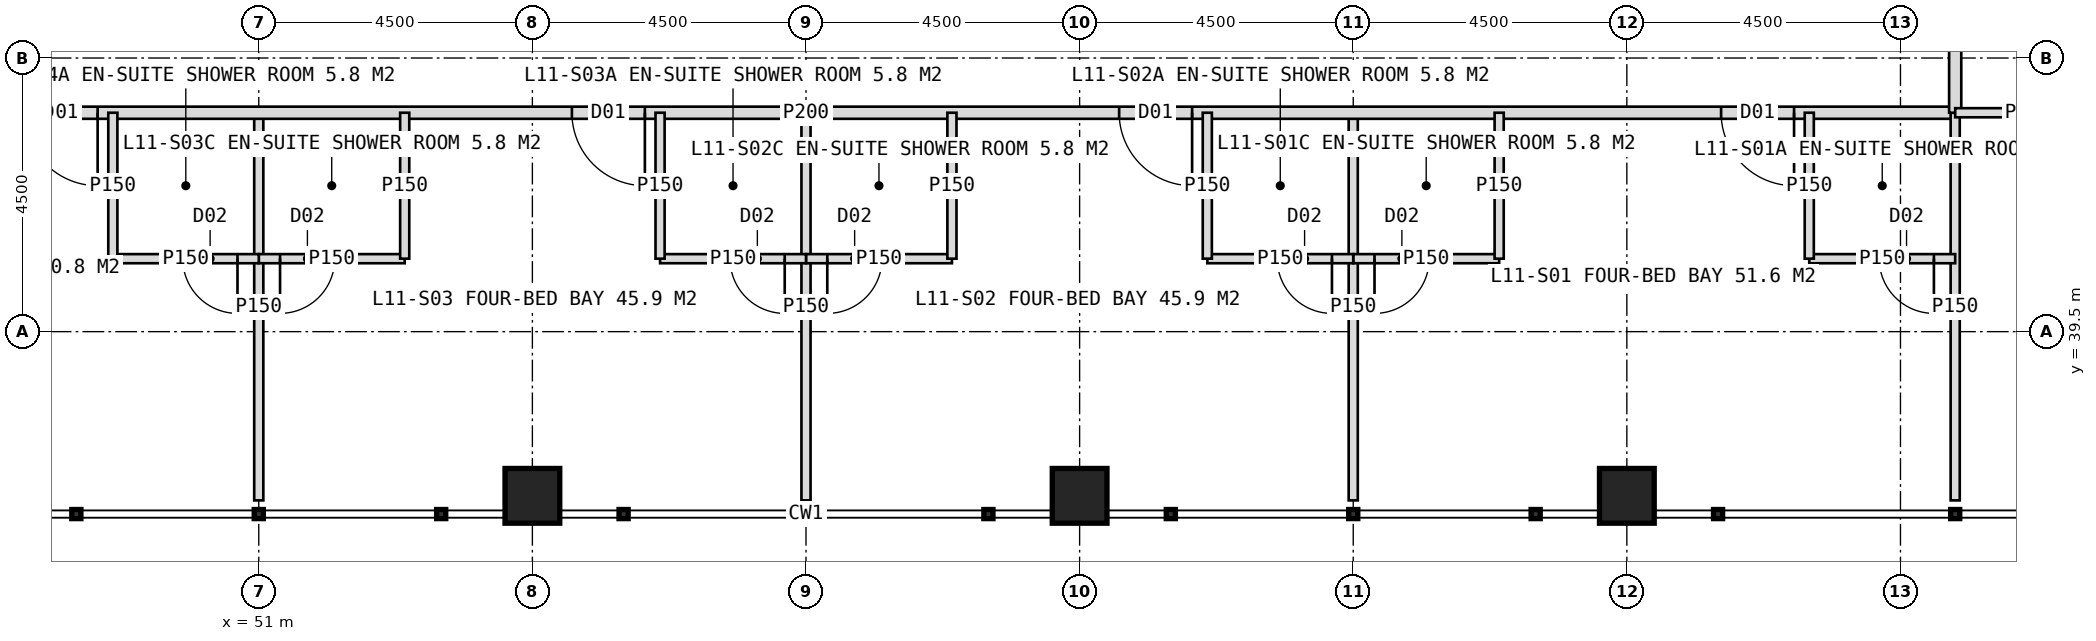
"""IFC4 building model, lengths in metres.
Left out: names, types, materials, properties, quantities, classifications, styles, units other than length and angle.
Written with IfcOpenShell. Run it as: python <this file> out.ifc"""

import sys

from ifc_helpers import new_model, si_unit, direction, frame, frame_2d, origin, origin_2d, place, context, subcontext, project, spatial, rectangle, hollow_rectangle, extrude, element, fill, save


model = new_model("IFC4")
c1 = context("Model", 3, precision=1e-05, world=origin(), true_north=direction((0.0, 1.0)))
c2 = subcontext(c1, "Body", "Model", "MODEL_VIEW")
j1 = project(units=[si_unit("LENGTHUNIT", "METRE"), si_unit("PLANEANGLEUNIT", "RADIAN")], contexts=[c1])
p1 = place(None, origin())
s1 = spatial("IfcSite", under=j1, at=p1, CompositionType="ELEMENT")
p2 = place(p1, origin())
s2 = spatial("IfcBuilding", under=s1, at=p2, CompositionType="ELEMENT")
p3 = place(p2, frame((0.0, 0.0, 51.0)))
s3 = spatial("IfcBuildingStorey", under=s2, at=p3, CompositionType="ELEMENT", Elevation=51.0)
for number, where, z_axis, x_axis in (
    (1, (55.5, 36.8, 0.0), (0.0, 0.0, 1.0), (1.0, 0.0, 0.0)),
    (2, (64.5, 36.8, 0.0), (0.0, 0.0, 1.0), (1.0, 0.0, 0.0)),
    (3, (73.5, 36.8, 0.0), (0.0, 0.0, 1.0), (1.0, 0.0, 0.0)),
):
    element("IfcColumn", number, at=place(p3, frame(where, z_axis=z_axis, x_axis=x_axis)), inside=s3, PredefinedType="COLUMN", context=c2, shape_type="SweptSolid", body=[
        extrude(hollow_rectangle(XDim=0.9, YDim=0.9, WallThickness=0.08, at=origin_2d()), origin(), (0.0, 0.0, 1.0), 4.0),
    ])
p4 = place(p3, frame((69.0, 43.1, 0.0), z_axis=(0.0, 0.0, 1.0), x_axis=(0.0, -1.0, 0.0)))
e4 = element("IfcWall", 4, at=p4, inside=s3, PredefinedType="PARTITIONING", context=c2, shape_type="SweptSolid", body=[
    extrude(rectangle(XDim=6.375, YDim=0.15, at=frame_2d((3.188, 0.0))), origin(), (0.0, 0.0, 1.0), 3.75),
])
p5 = place(p3, frame((60.0, 43.1, 0.0), z_axis=(0.0, 0.0, 1.0), x_axis=(0.0, -1.0, 0.0)))
e5 = element("IfcWall", 5, at=p5, inside=s3, PredefinedType="PARTITIONING", context=c2, shape_type="SweptSolid", body=[
    extrude(rectangle(XDim=6.375, YDim=0.15, at=frame_2d((3.188, 0.0))), origin(), (0.0, 0.0, 1.0), 2.75),
])
p6 = place(p3, frame((51.0, 43.1, 0.0), z_axis=(0.0, 0.0, 1.0), x_axis=(0.0, -1.0, 0.0)))
e6 = element("IfcWall", 6, at=p6, inside=s3, PredefinedType="PARTITIONING", context=c2, shape_type="SweptSolid", body=[
    extrude(rectangle(XDim=6.375, YDim=0.15, at=frame_2d((3.188, 0.0))), origin(), (0.0, 0.0, 1.0), 3.75),
])
p7 = place(p3, frame((78.9, 43.1, 0.0), z_axis=(0.0, 0.0, 1.0), x_axis=(-1.0, 0.0, 0.0)))
e7 = element("IfcWall", 7, at=p7, inside=s3, PredefinedType="PARTITIONING", context=c2, shape_type="SweptSolid", body=[
    extrude(rectangle(XDim=37.8, YDim=0.2, at=frame_2d((18.9, 0.0))), origin(), (0.0, 0.0, 1.0), 3.75),
])
p8 = place(p7, frame((2.65, 0.0, 0.0)))
e8 = element("IfcOpeningElement", 8, at=p8, cuts=e7, PredefinedType="OPENING", context=c2, shape_type="SweptSolid", body=[
    extrude(rectangle(XDim=1.2, YDim=2.2, at=frame_2d((0.6, 1.1))), frame((0.0, 0.11, 0.0), z_axis=(0.0, -1.0, 0.0), x_axis=(1.0, 0.0, 0.0)), (0.0, 0.0, 1.0), 0.22),
])
p9 = place(p7, frame((12.55, 0.0, 0.0)))
e9 = element("IfcOpeningElement", 9, at=p9, cuts=e7, PredefinedType="OPENING", context=c2, shape_type="SweptSolid", body=[
    extrude(rectangle(XDim=1.2, YDim=2.2, at=frame_2d((0.6, 1.1))), frame((0.0, 0.11, 0.0), z_axis=(0.0, -1.0, 0.0), x_axis=(1.0, 0.0, 0.0)), (0.0, 0.0, 1.0), 0.22),
])
p10 = place(p7, frame((21.55, 0.0, 0.0)))
e10 = element("IfcOpeningElement", 10, at=p10, cuts=e7, PredefinedType="OPENING", context=c2, shape_type="SweptSolid", body=[
    extrude(rectangle(XDim=1.2, YDim=2.2, at=frame_2d((0.6, 1.1))), frame((0.0, 0.11, 0.0), z_axis=(0.0, -1.0, 0.0), x_axis=(1.0, 0.0, 0.0)), (0.0, 0.0, 1.0), 0.22),
])
p11 = place(p7, frame((30.55, 0.0, 0.0)))
e11 = element("IfcOpeningElement", 11, at=p11, cuts=e7, PredefinedType="OPENING", context=c2, shape_type="SweptSolid", body=[
    extrude(rectangle(XDim=1.2, YDim=2.2, at=frame_2d((0.6, 1.1))), frame((0.0, 0.11, 0.0), z_axis=(0.0, -1.0, 0.0), x_axis=(1.0, 0.0, 0.0)), (0.0, 0.0, 1.0), 0.22),
])
p12 = place(p3, frame((78.9, 43.1, 0.0), z_axis=(0.0, 0.0, 1.0), x_axis=(0.0, -1.0, 0.0)))
e12 = element("IfcWall", 12, at=p12, inside=s3, PredefinedType="PARTITIONING", context=c2, shape_type="SweptSolid", body=[
    extrude(rectangle(XDim=6.375, YDim=0.15, at=frame_2d((3.188, 0.0))), origin(), (0.0, 0.0, 1.0), 3.75),
])
p13 = place(p3, frame((78.9, 40.7, 0.0), z_axis=(0.0, 0.0, 1.0), x_axis=(-1.0, 0.0, 0.0)))
e13 = element("IfcWall", 13, at=p13, inside=s3, PredefinedType="PARTITIONING", context=c2, shape_type="SweptSolid", body=[
    extrude(rectangle(XDim=2.4, YDim=0.15, at=frame_2d((1.2, 0.0))), origin(), (0.0, 0.0, 1.0), 3.75),
])
p14 = place(p13, frame((0.35, 0.0, 0.0)))
e14 = element("IfcOpeningElement", 14, at=p14, cuts=e13, PredefinedType="OPENING", context=c2, shape_type="SweptSolid", body=[
    extrude(rectangle(XDim=0.9, YDim=2.1, at=frame_2d((0.45, 1.05))), frame((0.0, 0.085, 0.0), z_axis=(0.0, -1.0, 0.0), x_axis=(1.0, 0.0, 0.0)), (0.0, 0.0, 1.0), 0.17),
])
p15 = place(p3, frame((76.5, 43.1, 0.0), z_axis=(0.0, 0.0, 1.0), x_axis=(0.0, -1.0, 0.0)))
e15 = element("IfcWall", 15, at=p15, inside=s3, PredefinedType="PARTITIONING", context=c2, shape_type="SweptSolid", body=[
    extrude(rectangle(XDim=2.4, YDim=0.15, at=frame_2d((1.2, 0.0))), origin(), (0.0, 0.0, 1.0), 3.75),
])
p16 = place(p3, frame((71.4, 40.7, 0.0), z_axis=(0.0, 0.0, 1.0), x_axis=(-1.0, 0.0, 0.0)))
e16 = element("IfcWall", 16, at=p16, inside=s3, PredefinedType="PARTITIONING", context=c2, shape_type="SweptSolid", body=[
    extrude(rectangle(XDim=2.4, YDim=0.15, at=frame_2d((1.2, 0.0))), origin(), (0.0, 0.0, 1.0), 3.75),
])
p17 = place(p16, frame((1.15, 0.0, 0.0)))
e17 = element("IfcOpeningElement", 17, at=p17, cuts=e16, PredefinedType="OPENING", context=c2, shape_type="SweptSolid", body=[
    extrude(rectangle(XDim=0.9, YDim=2.1, at=frame_2d((0.45, 1.05))), frame((0.0, 0.085, 0.0), z_axis=(0.0, -1.0, 0.0), x_axis=(1.0, 0.0, 0.0)), (0.0, 0.0, 1.0), 0.17),
])
p18 = place(p3, frame((71.4, 43.1, 0.0), z_axis=(0.0, 0.0, 1.0), x_axis=(0.0, -1.0, 0.0)))
e18 = element("IfcWall", 18, at=p18, inside=s3, PredefinedType="PARTITIONING", context=c2, shape_type="SweptSolid", body=[
    extrude(rectangle(XDim=2.4, YDim=0.15, at=frame_2d((1.2, 0.0))), origin(), (0.0, 0.0, 1.0), 3.75),
])
p19 = place(p3, frame((69.0, 40.7, 0.0), z_axis=(0.0, 0.0, 1.0), x_axis=(-1.0, 0.0, 0.0)))
e19 = element("IfcWall", 19, at=p19, inside=s3, PredefinedType="PARTITIONING", context=c2, shape_type="SweptSolid", body=[
    extrude(rectangle(XDim=2.4, YDim=0.15, at=frame_2d((1.2, 0.0))), origin(), (0.0, 0.0, 1.0), 3.75),
])
p20 = place(p19, frame((0.35, 0.0, 0.0)))
e20 = element("IfcOpeningElement", 20, at=p20, cuts=e19, PredefinedType="OPENING", context=c2, shape_type="SweptSolid", body=[
    extrude(rectangle(XDim=0.9, YDim=2.1, at=frame_2d((0.45, 1.05))), frame((0.0, 0.085, 0.0), z_axis=(0.0, -1.0, 0.0), x_axis=(1.0, 0.0, 0.0)), (0.0, 0.0, 1.0), 0.17),
])
p21 = place(p3, frame((66.6, 43.1, 0.0), z_axis=(0.0, 0.0, 1.0), x_axis=(0.0, -1.0, 0.0)))
e21 = element("IfcWall", 21, at=p21, inside=s3, PredefinedType="PARTITIONING", context=c2, shape_type="SweptSolid", body=[
    extrude(rectangle(XDim=2.4, YDim=0.15, at=frame_2d((1.2, 0.0))), origin(), (0.0, 0.0, 1.0), 3.75),
])
p22 = place(p3, frame((62.4, 40.7, 0.0), z_axis=(0.0, 0.0, 1.0), x_axis=(-1.0, 0.0, 0.0)))
e22 = element("IfcWall", 22, at=p22, inside=s3, PredefinedType="PARTITIONING", context=c2, shape_type="SweptSolid", body=[
    extrude(rectangle(XDim=2.4, YDim=0.15, at=frame_2d((1.2, 0.0))), origin(), (0.0, 0.0, 1.0), 3.75),
])
p23 = place(p22, frame((1.15, 0.0, 0.0)))
e23 = element("IfcOpeningElement", 23, at=p23, cuts=e22, PredefinedType="OPENING", context=c2, shape_type="SweptSolid", body=[
    extrude(rectangle(XDim=0.9, YDim=2.1, at=frame_2d((0.45, 1.05))), frame((0.0, 0.085, 0.0), z_axis=(0.0, -1.0, 0.0), x_axis=(1.0, 0.0, 0.0)), (0.0, 0.0, 1.0), 0.17),
])
p24 = place(p3, frame((62.4, 43.1, 0.0), z_axis=(0.0, 0.0, 1.0), x_axis=(0.0, -1.0, 0.0)))
e24 = element("IfcWall", 24, at=p24, inside=s3, PredefinedType="PARTITIONING", context=c2, shape_type="SweptSolid", body=[
    extrude(rectangle(XDim=2.4, YDim=0.15, at=frame_2d((1.2, 0.0))), origin(), (0.0, 0.0, 1.0), 3.75),
])
p25 = place(p3, frame((60.0, 40.7, 0.0), z_axis=(0.0, 0.0, 1.0), x_axis=(-1.0, 0.0, 0.0)))
e25 = element("IfcWall", 25, at=p25, inside=s3, PredefinedType="PARTITIONING", context=c2, shape_type="SweptSolid", body=[
    extrude(rectangle(XDim=2.4, YDim=0.15, at=frame_2d((1.2, 0.0))), origin(), (0.0, 0.0, 1.0), 3.75),
])
p26 = place(p25, frame((0.35, 0.0, 0.0)))
e26 = element("IfcOpeningElement", 26, at=p26, cuts=e25, PredefinedType="OPENING", context=c2, shape_type="SweptSolid", body=[
    extrude(rectangle(XDim=0.9, YDim=2.1, at=frame_2d((0.45, 1.05))), frame((0.0, 0.085, 0.0), z_axis=(0.0, -1.0, 0.0), x_axis=(1.0, 0.0, 0.0)), (0.0, 0.0, 1.0), 0.17),
])
p27 = place(p3, frame((57.6, 43.1, 0.0), z_axis=(0.0, 0.0, 1.0), x_axis=(0.0, -1.0, 0.0)))
e27 = element("IfcWall", 27, at=p27, inside=s3, PredefinedType="PARTITIONING", context=c2, shape_type="SweptSolid", body=[
    extrude(rectangle(XDim=2.4, YDim=0.15, at=frame_2d((1.2, 0.0))), origin(), (0.0, 0.0, 1.0), 3.75),
])
p28 = place(p3, frame((53.4, 40.7, 0.0), z_axis=(0.0, 0.0, 1.0), x_axis=(-1.0, 0.0, 0.0)))
e28 = element("IfcWall", 28, at=p28, inside=s3, PredefinedType="PARTITIONING", context=c2, shape_type="SweptSolid", body=[
    extrude(rectangle(XDim=2.4, YDim=0.15, at=frame_2d((1.2, 0.0))), origin(), (0.0, 0.0, 1.0), 3.75),
])
p29 = place(p28, frame((1.15, 0.0, 0.0)))
e29 = element("IfcOpeningElement", 29, at=p29, cuts=e28, PredefinedType="OPENING", context=c2, shape_type="SweptSolid", body=[
    extrude(rectangle(XDim=0.9, YDim=2.1, at=frame_2d((0.45, 1.05))), frame((0.0, 0.085, 0.0), z_axis=(0.0, -1.0, 0.0), x_axis=(1.0, 0.0, 0.0)), (0.0, 0.0, 1.0), 0.17),
])
p30 = place(p3, frame((53.4, 43.1, 0.0), z_axis=(0.0, 0.0, 1.0), x_axis=(0.0, -1.0, 0.0)))
e30 = element("IfcWall", 30, at=p30, inside=s3, PredefinedType="PARTITIONING", context=c2, shape_type="SweptSolid", body=[
    extrude(rectangle(XDim=2.4, YDim=0.15, at=frame_2d((1.2, 0.0))), origin(), (0.0, 0.0, 1.0), 3.75),
])
p31 = place(p3, frame((51.0, 40.7, 0.0), z_axis=(0.0, 0.0, 1.0), x_axis=(-1.0, 0.0, 0.0)))
e31 = element("IfcWall", 31, at=p31, inside=s3, PredefinedType="PARTITIONING", context=c2, shape_type="SweptSolid", body=[
    extrude(rectangle(XDim=2.4, YDim=0.15, at=frame_2d((1.2, 0.0))), origin(), (0.0, 0.0, 1.0), 3.75),
])
p32 = place(p31, frame((0.35, 0.0, 0.0)))
e32 = element("IfcOpeningElement", 32, at=p32, cuts=e31, PredefinedType="OPENING", context=c2, shape_type="SweptSolid", body=[
    extrude(rectangle(XDim=0.9, YDim=2.1, at=frame_2d((0.45, 1.05))), frame((0.0, 0.085, 0.0), z_axis=(0.0, -1.0, 0.0), x_axis=(1.0, 0.0, 0.0)), (0.0, 0.0, 1.0), 0.17),
])
p33 = place(p3, frame((48.6, 43.1, 0.0), z_axis=(0.0, 0.0, 1.0), x_axis=(0.0, -1.0, 0.0)))
e33 = element("IfcWall", 33, at=p33, inside=s3, PredefinedType="PARTITIONING", context=c2, shape_type="SweptSolid", body=[
    extrude(rectangle(XDim=2.4, YDim=0.15, at=frame_2d((1.2, 0.0))), origin(), (0.0, 0.0, 1.0), 3.75),
])
p34 = place(p3, frame((78.9, 80.9, 0.0), z_axis=(0.0, 0.0, 1.0), x_axis=(0.0, -1.0, 0.0)))
e34 = element("IfcWall", 34, at=p34, inside=s3, PredefinedType="PARTITIONING", context=c2, shape_type="SweptSolid", body=[
    extrude(rectangle(XDim=37.8, YDim=0.2, at=frame_2d((18.9, 0.0))), origin(), (0.0, 0.0, 1.0), 3.75),
])
p35 = place(p34, frame((3.25, 0.0, 0.0)))
e35 = element("IfcOpeningElement", 35, at=p35, cuts=e34, PredefinedType="OPENING", context=c2, shape_type="SweptSolid", body=[
    extrude(rectangle(XDim=1.2, YDim=2.2, at=frame_2d((0.6, 1.1))), frame((0.0, 0.11, 0.0), z_axis=(0.0, -1.0, 0.0), x_axis=(1.0, 0.0, 0.0)), (0.0, 0.0, 1.0), 0.22),
])
p36 = place(p34, frame((9.55, 0.0, 0.0)))
e36 = element("IfcOpeningElement", 36, at=p36, cuts=e34, PredefinedType="OPENING", context=c2, shape_type="SweptSolid", body=[
    extrude(rectangle(XDim=1.2, YDim=2.2, at=frame_2d((0.6, 1.1))), frame((0.0, 0.11, 0.0), z_axis=(0.0, -1.0, 0.0), x_axis=(1.0, 0.0, 0.0)), (0.0, 0.0, 1.0), 0.22),
])
p37 = place(p34, frame((15.55, 0.0, 0.0)))
e37 = element("IfcOpeningElement", 37, at=p37, cuts=e34, PredefinedType="OPENING", context=c2, shape_type="SweptSolid", body=[
    extrude(rectangle(XDim=1.2, YDim=2.2, at=frame_2d((0.6, 1.1))), frame((0.0, 0.11, 0.0), z_axis=(0.0, -1.0, 0.0), x_axis=(1.0, 0.0, 0.0)), (0.0, 0.0, 1.0), 0.22),
])
p38 = place(p34, frame((21.55, 0.0, 0.0)))
e38 = element("IfcOpeningElement", 38, at=p38, cuts=e34, PredefinedType="OPENING", context=c2, shape_type="SweptSolid", body=[
    extrude(rectangle(XDim=1.2, YDim=2.2, at=frame_2d((0.6, 1.1))), frame((0.0, 0.11, 0.0), z_axis=(0.0, -1.0, 0.0), x_axis=(1.0, 0.0, 0.0)), (0.0, 0.0, 1.0), 0.22),
])
p39 = place(p34, frame((30.55, 0.0, 0.0)))
e39 = element("IfcOpeningElement", 39, at=p39, cuts=e34, PredefinedType="OPENING", context=c2, shape_type="SweptSolid", body=[
    extrude(rectangle(XDim=1.2, YDim=2.2, at=frame_2d((0.6, 1.1))), frame((0.0, 0.11, 0.0), z_axis=(0.0, -1.0, 0.0), x_axis=(1.0, 0.0, 0.0)), (0.0, 0.0, 1.0), 0.22),
])
p40 = place(p3, frame((78.9, 43.1, 0.0), z_axis=(0.0, 0.0, 1.0), x_axis=(1.0, 0.0, 0.0)))
e40 = element("IfcWall", 40, at=p40, inside=s3, PredefinedType="PARTITIONING", context=c2, shape_type="SweptSolid", body=[
    extrude(rectangle(XDim=2.4, YDim=0.15, at=frame_2d((1.2, 0.0))), origin(), (0.0, 0.0, 1.0), 3.75),
])
p41 = place(p8, origin())
e41 = element("IfcDoor", 41, at=p41, inside=s3, OperationType="SINGLE_SWING_LEFT", PredefinedType="DOOR", context=c2, shape_type="SweptSolid", body=[
    extrude(rectangle(XDim=1.2, YDim=2.2, at=frame_2d((0.6, 1.1))), frame((0.0, 0.025, 0.0), z_axis=(0.0, -1.0, 0.0), x_axis=(1.0, 0.0, 0.0)), (0.0, 0.0, 1.0), 0.05),
])
fill(e8, e41)
p42 = place(p14, origin())
e42 = element("IfcDoor", 42, at=p42, inside=s3, OperationType="SINGLE_SWING_LEFT", PredefinedType="DOOR", context=c2, shape_type="SweptSolid", body=[
    extrude(rectangle(XDim=0.9, YDim=2.1, at=frame_2d((0.45, 1.05))), frame((0.0, 0.025, 0.0), z_axis=(0.0, -1.0, 0.0), x_axis=(1.0, 0.0, 0.0)), (0.0, 0.0, 1.0), 0.05),
])
fill(e14, e42)
p43 = place(p17, origin())
e43 = element("IfcDoor", 43, at=p43, inside=s3, OperationType="SINGLE_SWING_RIGHT", PredefinedType="DOOR", context=c2, shape_type="SweptSolid", body=[
    extrude(rectangle(XDim=0.9, YDim=2.1, at=frame_2d((0.45, 1.05))), frame((0.0, 0.025, 0.0), z_axis=(0.0, -1.0, 0.0), x_axis=(1.0, 0.0, 0.0)), (0.0, 0.0, 1.0), 0.05),
])
fill(e17, e43)
p44 = place(p9, origin())
e44 = element("IfcDoor", 44, at=p44, inside=s3, OperationType="SINGLE_SWING_LEFT", PredefinedType="DOOR", context=c2, shape_type="SweptSolid", body=[
    extrude(rectangle(XDim=1.2, YDim=2.2, at=frame_2d((0.6, 1.1))), frame((0.0, 0.025, 0.0), z_axis=(0.0, -1.0, 0.0), x_axis=(1.0, 0.0, 0.0)), (0.0, 0.0, 1.0), 0.05),
])
fill(e9, e44)
p45 = place(p20, origin())
e45 = element("IfcDoor", 45, at=p45, inside=s3, OperationType="SINGLE_SWING_LEFT", PredefinedType="DOOR", context=c2, shape_type="SweptSolid", body=[
    extrude(rectangle(XDim=0.9, YDim=2.1, at=frame_2d((0.45, 1.05))), frame((0.0, 0.025, 0.0), z_axis=(0.0, -1.0, 0.0), x_axis=(1.0, 0.0, 0.0)), (0.0, 0.0, 1.0), 0.05),
])
fill(e20, e45)
p46 = place(p23, origin())
e46 = element("IfcDoor", 46, at=p46, inside=s3, OperationType="SINGLE_SWING_RIGHT", PredefinedType="DOOR", context=c2, shape_type="SweptSolid", body=[
    extrude(rectangle(XDim=0.9, YDim=2.1, at=frame_2d((0.45, 1.05))), frame((0.0, 0.025, 0.0), z_axis=(0.0, -1.0, 0.0), x_axis=(1.0, 0.0, 0.0)), (0.0, 0.0, 1.0), 0.05),
])
fill(e23, e46)
p47 = place(p10, origin())
e47 = element("IfcDoor", 47, at=p47, inside=s3, OperationType="SINGLE_SWING_LEFT", PredefinedType="DOOR", context=c2, shape_type="SweptSolid", body=[
    extrude(rectangle(XDim=1.2, YDim=2.2, at=frame_2d((0.6, 1.1))), frame((0.0, 0.025, 0.0), z_axis=(0.0, -1.0, 0.0), x_axis=(1.0, 0.0, 0.0)), (0.0, 0.0, 1.0), 0.05),
])
fill(e10, e47)
p48 = place(p26, origin())
e48 = element("IfcDoor", 48, at=p48, inside=s3, OperationType="SINGLE_SWING_LEFT", PredefinedType="DOOR", context=c2, shape_type="SweptSolid", body=[
    extrude(rectangle(XDim=0.9, YDim=2.1, at=frame_2d((0.45, 1.05))), frame((0.0, 0.025, 0.0), z_axis=(0.0, -1.0, 0.0), x_axis=(1.0, 0.0, 0.0)), (0.0, 0.0, 1.0), 0.05),
])
fill(e26, e48)
p49 = place(p29, origin())
e49 = element("IfcDoor", 49, at=p49, inside=s3, OperationType="SINGLE_SWING_RIGHT", PredefinedType="DOOR", context=c2, shape_type="SweptSolid", body=[
    extrude(rectangle(XDim=0.9, YDim=2.1, at=frame_2d((0.45, 1.05))), frame((0.0, 0.025, 0.0), z_axis=(0.0, -1.0, 0.0), x_axis=(1.0, 0.0, 0.0)), (0.0, 0.0, 1.0), 0.05),
])
fill(e29, e49)
p50 = place(p11, origin())
e50 = element("IfcDoor", 50, at=p50, inside=s3, OperationType="SINGLE_SWING_LEFT", PredefinedType="DOOR", context=c2, shape_type="SweptSolid", body=[
    extrude(rectangle(XDim=1.2, YDim=2.2, at=frame_2d((0.6, 1.1))), frame((0.0, 0.025, 0.0), z_axis=(0.0, -1.0, 0.0), x_axis=(1.0, 0.0, 0.0)), (0.0, 0.0, 1.0), 0.05),
])
fill(e11, e50)
p51 = place(p32, origin())
e51 = element("IfcDoor", 51, at=p51, inside=s3, OperationType="SINGLE_SWING_LEFT", PredefinedType="DOOR", context=c2, shape_type="SweptSolid", body=[
    extrude(rectangle(XDim=0.9, YDim=2.1, at=frame_2d((0.45, 1.05))), frame((0.0, 0.025, 0.0), z_axis=(0.0, -1.0, 0.0), x_axis=(1.0, 0.0, 0.0)), (0.0, 0.0, 1.0), 0.05),
])
fill(e32, e51)
save(model, sys.argv[1])
